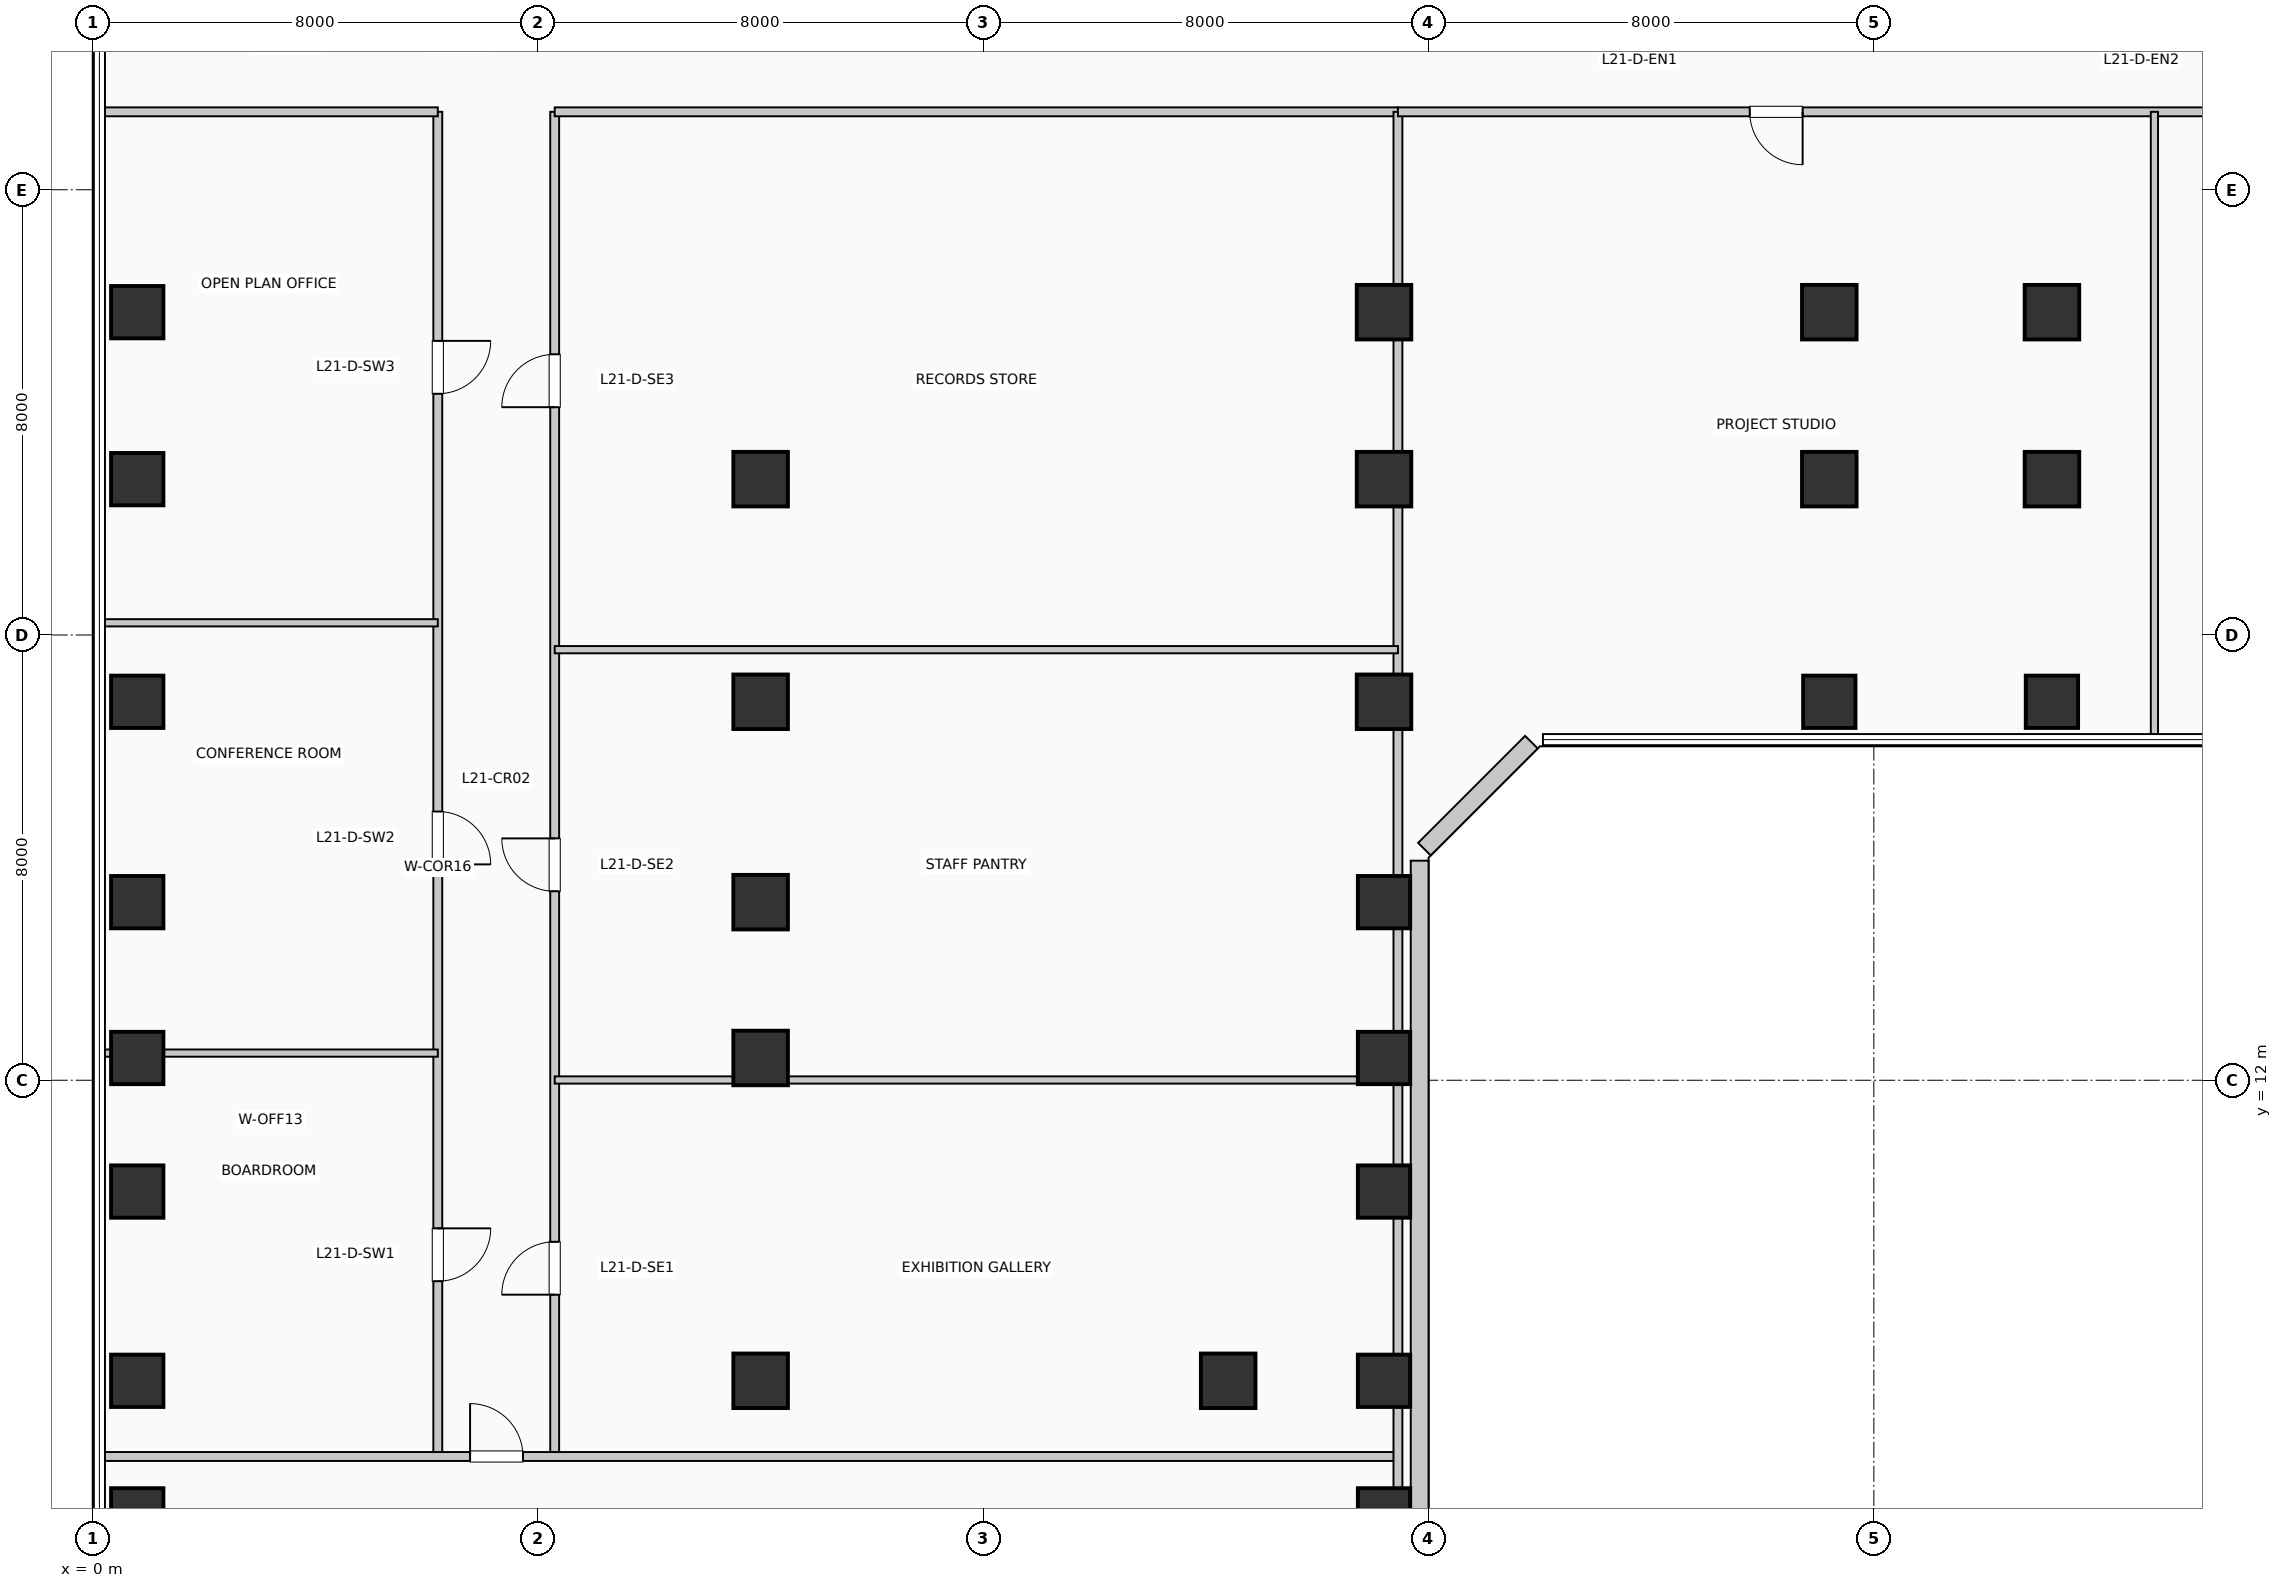
"""IFC4 building model, lengths in metres.
Left out: names, types, materials, properties, quantities, classifications, styles, units other than length and angle.
Written with IfcOpenShell. Run it as: python <this file> out.ifc"""

import sys

from ifc_helpers import new_model, si_unit, direction, frame, frame_2d, origin, origin_2d, place, context, subcontext, project, spatial, rectangle, extrude, element, fill, save


model = new_model("IFC4")
c1 = context("Model", 3, precision=1e-05, world=origin(), true_north=direction((0.0, 1.0)))
c2 = subcontext(c1, "Body", "Model", "MODEL_VIEW")
j1 = project(units=[si_unit("LENGTHUNIT", "METRE"), si_unit("PLANEANGLEUNIT", "RADIAN")], contexts=[c1])
p1 = place(None, origin())
s1 = spatial("IfcSite", under=j1, at=p1, CompositionType="ELEMENT")
p2 = place(p1, origin())
s2 = spatial("IfcBuilding", under=s1, at=p2, CompositionType="ELEMENT")
p3 = place(p2, frame((0.0, 0.0, 89.76)))
s3 = spatial("IfcBuildingStorey", under=s2, at=p3, CompositionType="ELEMENT", Elevation=89.76)
for number, where, z_axis, x_axis in (
    (1, (0.8, 4.2, 0.0), (0.0, 0.0, 1.0), (1.0, 0.0, 0.0)),
    (2, (0.8, 6.6, 0.0), (0.0, 0.0, 1.0), (1.0, 0.0, 0.0)),
    (3, (0.8, 10.0, 0.0), (0.0, 0.0, 1.0), (1.0, 0.0, 0.0)),
    (4, (0.8, 12.4, 0.0), (0.0, 0.0, 1.0), (1.0, 0.0, 0.0)),
    (5, (0.8, 15.2, 0.0), (0.0, 0.0, 1.0), (1.0, 0.0, 0.0)),
    (6, (0.8, 18.8, 0.0), (0.0, 0.0, 1.0), (1.0, 0.0, 0.0)),
    (7, (0.8, 22.8, 0.0), (0.0, 0.0, 1.0), (1.0, 0.0, 0.0)),
    (8, (0.8, 25.8, 0.0), (0.0, 0.0, 1.0), (1.0, 0.0, 0.0)),
):
    element("IfcColumn", number, at=place(p3, frame(where, z_axis=z_axis, x_axis=x_axis)), inside=s3, PredefinedType="COLUMN", context=c2, shape_type="SweptSolid", body=[
        extrude(rectangle(XDim=0.94, YDim=0.94, at=origin_2d()), origin(), (0.0, 0.0, 1.0), 3.96),
    ])
for number, where, z_axis, x_axis in (
    (9, (12.0, 6.6, 0.0), (0.0, 0.0, 1.0), (1.0, 0.0, 0.0)),
    (10, (12.0, 12.4, 0.0), (0.0, 0.0, 1.0), (1.0, 0.0, 0.0)),
    (11, (12.0, 15.2, 0.0), (0.0, 0.0, 1.0), (1.0, 0.0, 0.0)),
    (12, (12.0, 18.8, 0.0), (0.0, 0.0, 1.0), (1.0, 0.0, 0.0)),
    (13, (12.0, 22.8, 0.0), (0.0, 0.0, 1.0), (1.0, 0.0, 0.0)),
    (14, (20.4, 6.6, 0.0), (0.0, 0.0, 1.0), (1.0, 0.0, 0.0)),
):
    element("IfcColumn", number, at=place(p3, frame(where, z_axis=z_axis, x_axis=x_axis)), inside=s3, PredefinedType="COLUMN", context=c2, shape_type="SweptSolid", body=[
        extrude(rectangle(XDim=0.98, YDim=0.98, at=origin_2d()), origin(), (0.0, 0.0, 1.0), 3.96),
    ])
for number, where, z_axis, x_axis in (
    (15, (23.2, 4.2, 0.0), (0.0, 0.0, 1.0), (1.0, 0.0, 0.0)),
    (16, (23.2, 6.6, 0.0), (0.0, 0.0, 1.0), (1.0, 0.0, 0.0)),
    (17, (23.2, 10.0, 0.0), (0.0, 0.0, 1.0), (1.0, 0.0, 0.0)),
    (18, (23.2, 12.4, 0.0), (0.0, 0.0, 1.0), (1.0, 0.0, 0.0)),
    (19, (23.2, 15.2, 0.0), (0.0, 0.0, 1.0), (1.0, 0.0, 0.0)),
):
    element("IfcColumn", number, at=place(p3, frame(where, z_axis=z_axis, x_axis=x_axis)), inside=s3, PredefinedType="COLUMN", context=c2, shape_type="SweptSolid", body=[
        extrude(rectangle(XDim=0.94, YDim=0.94, at=origin_2d()), origin(), (0.0, 0.0, 1.0), 3.96),
    ])
for number, where, z_axis, x_axis in (
    (20, (23.2, 18.8, 0.0), (0.0, 0.0, 1.0), (1.0, 0.0, 0.0)),
    (21, (23.2, 22.8, 0.0), (0.0, 0.0, 1.0), (1.0, 0.0, 0.0)),
    (22, (23.2, 25.8, 0.0), (0.0, 0.0, 1.0), (1.0, 0.0, 0.0)),
):
    element("IfcColumn", number, at=place(p3, frame(where, z_axis=z_axis, x_axis=x_axis)), inside=s3, PredefinedType="COLUMN", context=c2, shape_type="SweptSolid", body=[
        extrude(rectangle(XDim=0.98, YDim=0.98, at=origin_2d()), origin(), (0.0, 0.0, 1.0), 3.96),
    ])
p4 = place(p3, frame((31.2, 18.8, 0.0), z_axis=(0.0, 0.0, 1.0), x_axis=(1.0, 0.0, 0.0)))
e23 = element("IfcColumn", 23, at=p4, inside=s3, PredefinedType="COLUMN", context=c2, shape_type="SweptSolid", body=[
    extrude(rectangle(XDim=0.94, YDim=0.94, at=origin_2d()), origin(), (0.0, 0.0, 1.0), 3.96),
])
for number, where, z_axis, x_axis in (
    (24, (31.2, 22.8, 0.0), (0.0, 0.0, 1.0), (1.0, 0.0, 0.0)),
    (25, (31.2, 25.8, 0.0), (0.0, 0.0, 1.0), (1.0, 0.0, 0.0)),
):
    element("IfcColumn", number, at=place(p3, frame(where, z_axis=z_axis, x_axis=x_axis)), inside=s3, PredefinedType="COLUMN", context=c2, shape_type="SweptSolid", body=[
        extrude(rectangle(XDim=0.98, YDim=0.98, at=origin_2d()), origin(), (0.0, 0.0, 1.0), 3.96),
    ])
p5 = place(p3, frame((35.2, 18.8, 0.0), z_axis=(0.0, 0.0, 1.0), x_axis=(1.0, 0.0, 0.0)))
e26 = element("IfcColumn", 26, at=p5, inside=s3, PredefinedType="COLUMN", context=c2, shape_type="SweptSolid", body=[
    extrude(rectangle(XDim=0.94, YDim=0.94, at=origin_2d()), origin(), (0.0, 0.0, 1.0), 3.96),
])
for number, where, z_axis, x_axis in (
    (27, (35.2, 22.8, 0.0), (0.0, 0.0, 1.0), (1.0, 0.0, 0.0)),
    (28, (35.2, 25.8, 0.0), (0.0, 0.0, 1.0), (1.0, 0.0, 0.0)),
):
    element("IfcColumn", number, at=place(p3, frame(where, z_axis=z_axis, x_axis=x_axis)), inside=s3, PredefinedType="COLUMN", context=c2, shape_type="SweptSolid", body=[
        extrude(rectangle(XDim=0.98, YDim=0.98, at=origin_2d()), origin(), (0.0, 0.0, 1.0), 3.96),
    ])
p6 = place(p3, frame((23.84, 3.055, 0.0), z_axis=(0.0, 0.0, 1.0), x_axis=(0.0, 1.0, 0.0)))
e29 = element("IfcWall", 29, at=p6, inside=s3, PredefinedType="SOLIDWALL", context=c2, shape_type="SweptSolid", body=[
    extrude(rectangle(XDim=12.89, YDim=0.32, at=frame_2d((6.445, 0.0))), origin(), (0.0, 0.0, 1.0), 3.61),
])
p7 = place(p3, frame((23.926, 16.152, 0.0), z_axis=(0.0, 0.0, 1.0), x_axis=(0.707106781187, 0.707106781187, 0.0)))
e30 = element("IfcWall", 30, at=p7, inside=s3, PredefinedType="SOLIDWALL", context=c2, shape_type="SweptSolid", body=[
    extrude(rectangle(XDim=2.718, YDim=0.32, at=frame_2d((1.359, 0.0))), origin(), (0.0, 0.0, 1.0), 3.61),
])
p8 = place(p3, frame((6.2, 5.24, 0.0), z_axis=(0.0, 0.0, 1.0), x_axis=(0.0, 1.0, 0.0)))
e31 = element("IfcWall", 31, at=p8, inside=s3, PredefinedType="PARTITIONING", context=c2, shape_type="SweptSolid", body=[
    extrude(rectangle(XDim=24.16, YDim=0.16, at=frame_2d((12.08, 0.0))), origin(), (0.0, 0.0, 1.0), 3.61),
])
p9 = place(p8, frame((4.099, 0.0, 0.0), z_axis=(0.0, 0.0, 1.0), x_axis=(-1.0, 0.0, 0.0)))
e32 = element("IfcOpeningElement", 32, at=p9, cuts=e31, PredefinedType="OPENING", context=c2, shape_type="SweptSolid", body=[
    extrude(rectangle(XDim=0.95, YDim=2.15, at=frame_2d((0.475, 1.075))), frame((0.0, 0.09, 0.0), z_axis=(0.0, -1.0, 0.0), x_axis=(1.0, 0.0, 0.0)), (0.0, 0.0, 1.0), 0.18),
])
p10 = place(p8, frame((11.589, 0.0, 0.0), z_axis=(0.0, 0.0, 1.0), x_axis=(-1.0, 0.0, 0.0)))
e33 = element("IfcOpeningElement", 33, at=p10, cuts=e31, PredefinedType="OPENING", context=c2, shape_type="SweptSolid", body=[
    extrude(rectangle(XDim=0.95, YDim=2.15, at=frame_2d((0.475, 1.075))), frame((0.0, 0.09, 0.0), z_axis=(0.0, -1.0, 0.0), x_axis=(1.0, 0.0, 0.0)), (0.0, 0.0, 1.0), 0.18),
])
p11 = place(p8, frame((20.044, 0.0, 0.0), z_axis=(0.0, 0.0, 1.0), x_axis=(-1.0, 0.0, 0.0)))
e34 = element("IfcOpeningElement", 34, at=p11, cuts=e31, PredefinedType="OPENING", context=c2, shape_type="SweptSolid", body=[
    extrude(rectangle(XDim=0.95, YDim=2.15, at=frame_2d((0.475, 1.075))), frame((0.0, 0.09, 0.0), z_axis=(0.0, -1.0, 0.0), x_axis=(1.0, 0.0, 0.0)), (0.0, 0.0, 1.0), 0.18),
])
p12 = place(p3, frame((8.3, 5.24, 0.0), z_axis=(0.0, 0.0, 1.0), x_axis=(0.0, 1.0, 0.0)))
e35 = element("IfcWall", 35, at=p12, inside=s3, PredefinedType="PARTITIONING", context=c2, shape_type="SweptSolid", body=[
    extrude(rectangle(XDim=24.16, YDim=0.16, at=frame_2d((12.08, 0.0))), origin(), (0.0, 0.0, 1.0), 3.61),
])
p13 = place(p12, frame((2.907, 0.0, 0.0)))
e36 = element("IfcOpeningElement", 36, at=p13, cuts=e35, PredefinedType="OPENING", context=c2, shape_type="SweptSolid", body=[
    extrude(rectangle(XDim=0.95, YDim=2.15, at=frame_2d((0.475, 1.075))), frame((0.0, 0.09, 0.0), z_axis=(0.0, -1.0, 0.0), x_axis=(1.0, 0.0, 0.0)), (0.0, 0.0, 1.0), 0.18),
])
p14 = place(p12, frame((10.156, 0.0, 0.0)))
e37 = element("IfcOpeningElement", 37, at=p14, cuts=e35, PredefinedType="OPENING", context=c2, shape_type="SweptSolid", body=[
    extrude(rectangle(XDim=0.95, YDim=2.15, at=frame_2d((0.475, 1.075))), frame((0.0, 0.09, 0.0), z_axis=(0.0, -1.0, 0.0), x_axis=(1.0, 0.0, 0.0)), (0.0, 0.0, 1.0), 0.18),
])
p15 = place(p12, frame((18.853, 0.0, 0.0)))
e38 = element("IfcOpeningElement", 38, at=p15, cuts=e35, PredefinedType="OPENING", context=c2, shape_type="SweptSolid", body=[
    extrude(rectangle(XDim=0.95, YDim=2.15, at=frame_2d((0.475, 1.075))), frame((0.0, 0.09, 0.0), z_axis=(0.0, -1.0, 0.0), x_axis=(1.0, 0.0, 0.0)), (0.0, 0.0, 1.0), 0.18),
])
p16 = place(p3, frame((0.19, 5.24, 0.0), z_axis=(0.0, 0.0, 1.0), x_axis=(1.0, 0.0, 0.0)))
e39 = element("IfcWall", 39, at=p16, inside=s3, PredefinedType="PARTITIONING", context=c2, shape_type="SweptSolid", body=[
    extrude(rectangle(XDim=23.26, YDim=0.16, at=frame_2d((11.63, 0.0))), origin(), (0.0, 0.0, 1.0), 3.61),
])
p17 = place(p16, frame((6.59, 0.0, 0.0)))
e40 = element("IfcOpeningElement", 40, at=p17, cuts=e39, PredefinedType="OPENING", context=c2, shape_type="SweptSolid", body=[
    extrude(rectangle(XDim=0.95, YDim=2.15, at=frame_2d((0.475, 1.075))), frame((0.0, 0.09, 0.0), z_axis=(0.0, -1.0, 0.0), x_axis=(1.0, 0.0, 0.0)), (0.0, 0.0, 1.0), 0.18),
])
p18 = place(p3, frame((0.19, 29.4, 0.0), z_axis=(0.0, 0.0, 1.0), x_axis=(1.0, 0.0, 0.0)))
e41 = element("IfcWall", 41, at=p18, inside=s3, PredefinedType="PARTITIONING", context=c2, shape_type="SweptSolid", body=[
    extrude(rectangle(XDim=6.01, YDim=0.16, at=frame_2d((3.005, 0.0))), origin(), (0.0, 0.0, 1.0), 3.265),
])
p19 = place(p3, frame((8.3, 29.4, 0.0), z_axis=(0.0, 0.0, 1.0), x_axis=(1.0, 0.0, 0.0)))
e42 = element("IfcWall", 42, at=p19, inside=s3, PredefinedType="PARTITIONING", context=c2, shape_type="SweptSolid", body=[
    extrude(rectangle(XDim=15.15, YDim=0.16, at=frame_2d((7.575, 0.0))), origin(), (0.0, 0.0, 1.0), 3.265),
])
p20 = place(p3, frame((23.45, 1.04, 0.0), z_axis=(0.0, 0.0, 1.0), x_axis=(0.0, 1.0, 0.0)))
e43 = element("IfcWall", 43, at=p20, inside=s3, PredefinedType="PARTITIONING", context=c2, shape_type="SweptSolid", body=[
    extrude(rectangle(XDim=28.36, YDim=0.16, at=frame_2d((14.18, 0.0))), origin(), (0.0, 0.0, 1.0), 2.895),
])
p21 = place(p3, frame((0.19, 12.488, 0.0), z_axis=(0.0, 0.0, 1.0), x_axis=(1.0, 0.0, 0.0)))
e44 = element("IfcWall", 44, at=p21, inside=s3, PredefinedType="PARTITIONING", context=c2, shape_type="SweptSolid", body=[
    extrude(rectangle(XDim=6.01, YDim=0.13, at=frame_2d((3.005, 0.0))), origin(), (0.0, 0.0, 1.0), 2.895),
])
p22 = place(p3, frame((0.19, 20.219, 0.0), z_axis=(0.0, 0.0, 1.0), x_axis=(1.0, 0.0, 0.0)))
e45 = element("IfcWall", 45, at=p22, inside=s3, PredefinedType="PARTITIONING", context=c2, shape_type="SweptSolid", body=[
    extrude(rectangle(XDim=6.01, YDim=0.13, at=frame_2d((3.005, 0.0))), origin(), (0.0, 0.0, 1.0), 3.61),
])
p23 = place(p3, frame((8.3, 12.005, 0.0), z_axis=(0.0, 0.0, 1.0), x_axis=(1.0, 0.0, 0.0)))
e46 = element("IfcWall", 46, at=p23, inside=s3, PredefinedType="PARTITIONING", context=c2, shape_type="SweptSolid", body=[
    extrude(rectangle(XDim=15.15, YDim=0.13, at=frame_2d((7.575, 0.0))), origin(), (0.0, 0.0, 1.0), 2.895),
])
p24 = place(p3, frame((8.3, 19.736, 0.0), z_axis=(0.0, 0.0, 1.0), x_axis=(1.0, 0.0, 0.0)))
e47 = element("IfcWall", 47, at=p24, inside=s3, PredefinedType="PARTITIONING", context=c2, shape_type="SweptSolid", body=[
    extrude(rectangle(XDim=15.15, YDim=0.13, at=frame_2d((7.575, 0.0))), origin(), (0.0, 0.0, 1.0), 3.61),
])
p25 = place(p3, frame((23.45, 29.4, 0.0), z_axis=(0.0, 0.0, 1.0), x_axis=(1.0, 0.0, 0.0)))
e48 = element("IfcWall", 48, at=p25, inside=s3, PredefinedType="PARTITIONING", context=c2, shape_type="SweptSolid", body=[
    extrude(rectangle(XDim=32.36, YDim=0.16, at=frame_2d((16.18, 0.0))), origin(), (0.0, 0.0, 1.0), 3.265),
])
p26 = place(p25, frame((7.271, 0.0, 0.0), z_axis=(0.0, 0.0, 1.0), x_axis=(-1.0, 0.0, 0.0)))
e49 = element("IfcOpeningElement", 49, at=p26, cuts=e48, PredefinedType="OPENING", context=c2, shape_type="SweptSolid", body=[
    extrude(rectangle(XDim=0.95, YDim=2.15, at=frame_2d((0.475, 1.075))), frame((0.0, 0.09, 0.0), z_axis=(0.0, -1.0, 0.0), x_axis=(1.0, 0.0, 0.0)), (0.0, 0.0, 1.0), 0.18),
])
p27 = place(p25, frame((23.45, 0.0, 0.0), z_axis=(0.0, 0.0, 1.0), x_axis=(-1.0, 0.0, 0.0)))
e50 = element("IfcOpeningElement", 50, at=p27, cuts=e48, PredefinedType="OPENING", context=c2, shape_type="SweptSolid", body=[
    extrude(rectangle(XDim=0.95, YDim=2.15, at=frame_2d((0.475, 1.075))), frame((0.0, 0.09, 0.0), z_axis=(0.0, -1.0, 0.0), x_axis=(1.0, 0.0, 0.0)), (0.0, 0.0, 1.0), 0.18),
])
p28 = place(p3, frame((37.041, 18.19, 0.0), z_axis=(0.0, 0.0, 1.0), x_axis=(0.0, 1.0, 0.0)))
e51 = element("IfcWall", 51, at=p28, inside=s3, PredefinedType="PARTITIONING", context=c2, shape_type="SweptSolid", body=[
    extrude(rectangle(XDim=11.21, YDim=0.13, at=frame_2d((5.605, 0.0))), origin(), (0.0, 0.0, 1.0), 3.61),
])
p29 = place(p17, origin())
e52 = element("IfcDoor", 52, at=p29, inside=s3, OperationType="SINGLE_SWING_LEFT", PredefinedType="DOOR", context=c2, shape_type="SweptSolid", body=[
    extrude(rectangle(XDim=0.95, YDim=2.15, at=frame_2d((0.475, 1.075))), frame((0.0, 0.025, 0.0), z_axis=(0.0, -1.0, 0.0), x_axis=(1.0, 0.0, 0.0)), (0.0, 0.0, 1.0), 0.05),
])
fill(e40, e52)
p30 = place(p9, origin())
e53 = element("IfcDoor", 53, at=p30, inside=s3, OperationType="SINGLE_SWING_RIGHT", PredefinedType="DOOR", context=c2, shape_type="SweptSolid", body=[
    extrude(rectangle(XDim=0.95, YDim=2.15, at=frame_2d((0.475, 1.075))), frame((0.0, 0.025, 0.0), z_axis=(0.0, -1.0, 0.0), x_axis=(1.0, 0.0, 0.0)), (0.0, 0.0, 1.0), 0.05),
])
fill(e32, e53)
p31 = place(p10, origin())
e54 = element("IfcDoor", 54, at=p31, inside=s3, OperationType="SINGLE_SWING_LEFT", PredefinedType="DOOR", context=c2, shape_type="SweptSolid", body=[
    extrude(rectangle(XDim=0.95, YDim=2.15, at=frame_2d((0.475, 1.075))), frame((0.0, 0.025, 0.0), z_axis=(0.0, -1.0, 0.0), x_axis=(1.0, 0.0, 0.0)), (0.0, 0.0, 1.0), 0.05),
])
fill(e33, e54)
p32 = place(p11, origin())
e55 = element("IfcDoor", 55, at=p32, inside=s3, OperationType="SINGLE_SWING_RIGHT", PredefinedType="DOOR", context=c2, shape_type="SweptSolid", body=[
    extrude(rectangle(XDim=0.95, YDim=2.15, at=frame_2d((0.475, 1.075))), frame((0.0, 0.025, 0.0), z_axis=(0.0, -1.0, 0.0), x_axis=(1.0, 0.0, 0.0)), (0.0, 0.0, 1.0), 0.05),
])
fill(e34, e55)
p33 = place(p13, origin())
e56 = element("IfcDoor", 56, at=p33, inside=s3, OperationType="SINGLE_SWING_LEFT", PredefinedType="DOOR", context=c2, shape_type="SweptSolid", body=[
    extrude(rectangle(XDim=0.95, YDim=2.15, at=frame_2d((0.475, 1.075))), frame((0.0, 0.025, 0.0), z_axis=(0.0, -1.0, 0.0), x_axis=(1.0, 0.0, 0.0)), (0.0, 0.0, 1.0), 0.05),
])
fill(e36, e56)
p34 = place(p14, origin())
e57 = element("IfcDoor", 57, at=p34, inside=s3, OperationType="SINGLE_SWING_RIGHT", PredefinedType="DOOR", context=c2, shape_type="SweptSolid", body=[
    extrude(rectangle(XDim=0.95, YDim=2.15, at=frame_2d((0.475, 1.075))), frame((0.0, 0.025, 0.0), z_axis=(0.0, -1.0, 0.0), x_axis=(1.0, 0.0, 0.0)), (0.0, 0.0, 1.0), 0.05),
])
fill(e37, e57)
p35 = place(p15, origin())
e58 = element("IfcDoor", 58, at=p35, inside=s3, OperationType="SINGLE_SWING_LEFT", PredefinedType="DOOR", context=c2, shape_type="SweptSolid", body=[
    extrude(rectangle(XDim=0.95, YDim=2.15, at=frame_2d((0.475, 1.075))), frame((0.0, 0.025, 0.0), z_axis=(0.0, -1.0, 0.0), x_axis=(1.0, 0.0, 0.0)), (0.0, 0.0, 1.0), 0.05),
])
fill(e38, e58)
p36 = place(p26, origin())
e59 = element("IfcDoor", 59, at=p36, inside=s3, OperationType="SINGLE_SWING_RIGHT", PredefinedType="DOOR", context=c2, shape_type="SweptSolid", body=[
    extrude(rectangle(XDim=0.95, YDim=2.15, at=frame_2d((0.475, 1.075))), frame((0.0, 0.025, 0.0), z_axis=(0.0, -1.0, 0.0), x_axis=(1.0, 0.0, 0.0)), (0.0, 0.0, 1.0), 0.05),
])
fill(e49, e59)
save(model, sys.argv[1])
